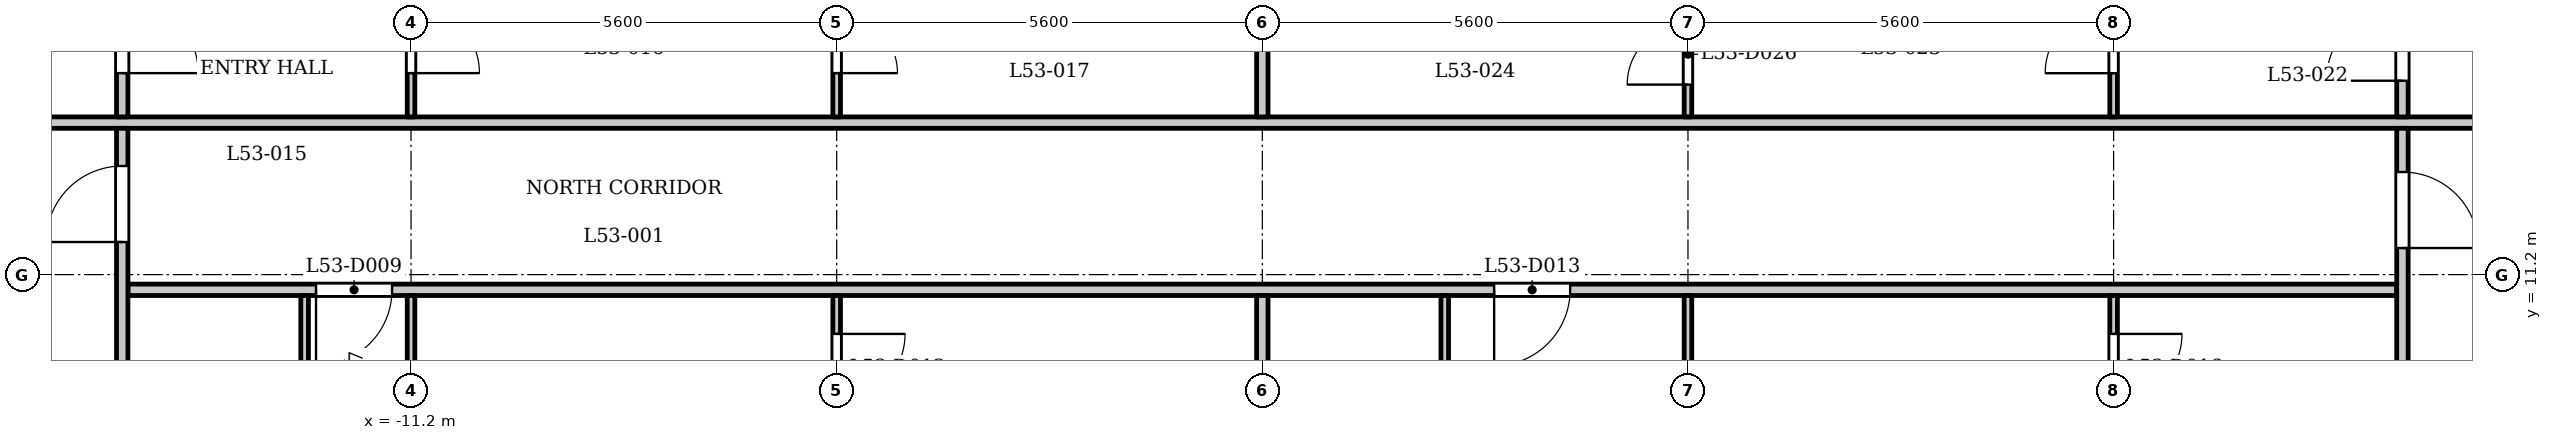
"""IFC4 building model, lengths in metres.
Left out: names, types, materials, properties, quantities, classifications, styles, units other than length and angle.
Written with IfcOpenShell. Run it as: python <this file> out.ifc"""

import sys

from ifc_helpers import new_model, si_unit, direction, frame, frame_2d, origin, place, context, subcontext, project, spatial, rectangle, extrude, element, fill, save


model = new_model("IFC4")
c1 = context("Model", 3, precision=1e-05, world=origin(), true_north=direction((0.0, 1.0)))
c2 = subcontext(c1, "Body", "Model", "MODEL_VIEW")
j1 = project(units=[si_unit("LENGTHUNIT", "METRE"), si_unit("PLANEANGLEUNIT", "RADIAN")], contexts=[c1])
p1 = place(None, origin())
s1 = spatial("IfcSite", under=j1, at=p1, CompositionType="ELEMENT")
p2 = place(p1, origin())
s2 = spatial("IfcBuilding", under=s1, at=p2, CompositionType="ELEMENT")
p3 = place(p2, frame((0.0, 0.0, 206.4)))
s3 = spatial("IfcBuildingStorey", under=s2, at=p3, CompositionType="ELEMENT", Elevation=206.4)
p4 = place(p3, frame((-14.925, 11.0, 0.0), z_axis=(0.0, 0.0, 1.0), x_axis=(1.0, 0.0, 0.0)))
e1 = element("IfcWall", 1, at=p4, inside=s3, PredefinedType="PARTITIONING", context=c2, shape_type="SweptSolid", body=[
    extrude(rectangle(XDim=29.85, YDim=0.15, at=frame_2d((14.925, 0.0))), origin(), (0.0, 0.0, 1.0), 3.2),
])
p5 = place(p4, frame((2.475, 0.0, 0.0)))
e2 = element("IfcOpeningElement", 2, at=p5, cuts=e1, PredefinedType="OPENING", context=c2, shape_type="SweptSolid", body=[
    extrude(rectangle(XDim=1.0, YDim=2.1, at=frame_2d((0.5, 1.05))), frame((0.0, 0.085, 0.0), z_axis=(0.0, -1.0, 0.0), x_axis=(1.0, 0.0, 0.0)), (0.0, 0.0, 1.0), 0.17),
])
p6 = place(p4, frame((17.975, 0.0, 0.0)))
e3 = element("IfcOpeningElement", 3, at=p6, cuts=e1, PredefinedType="OPENING", context=c2, shape_type="SweptSolid", body=[
    extrude(rectangle(XDim=1.0, YDim=2.1, at=frame_2d((0.5, 1.05))), frame((0.0, 0.085, 0.0), z_axis=(0.0, -1.0, 0.0), x_axis=(1.0, 0.0, 0.0)), (0.0, 0.0, 1.0), 0.17),
])
p7 = place(p3, frame((-17.4, 13.2, 0.0), z_axis=(0.0, 0.0, 1.0), x_axis=(1.0, 0.0, 0.0)))
e4 = element("IfcWall", 4, at=p7, inside=s3, PredefinedType="PARTITIONING", context=c2, shape_type="SweptSolid", body=[
    extrude(rectangle(XDim=34.8, YDim=0.15, at=frame_2d((17.4, 0.0))), origin(), (0.0, 0.0, 1.0), 3.2),
])
p8 = place(p7, frame((0.25, 0.0, 0.0)))
e5 = element("IfcOpeningElement", 5, at=p8, cuts=e4, PredefinedType="OPENING", context=c2, shape_type="SweptSolid", body=[
    extrude(rectangle(XDim=1.0, YDim=2.1, at=frame_2d((0.5, 1.05))), frame((0.0, 0.085, 0.0), z_axis=(0.0, -1.0, 0.0), x_axis=(1.0, 0.0, 0.0)), (0.0, 0.0, 1.0), 0.17),
])
p9 = place(p7, frame((33.65, 0.0, 0.0)))
e6 = element("IfcOpeningElement", 6, at=p9, cuts=e4, PredefinedType="OPENING", context=c2, shape_type="SweptSolid", body=[
    extrude(rectangle(XDim=1.0, YDim=2.1, at=frame_2d((0.5, 1.05))), frame((0.0, 0.085, 0.0), z_axis=(0.0, -1.0, 0.0), x_axis=(1.0, 0.0, 0.0)), (0.0, 0.0, 1.0), 0.17),
])
p10 = place(p3, frame((-15.0, 6.769, 0.0), z_axis=(0.0, 0.0, 1.0), x_axis=(0.0, 1.0, 0.0)))
e7 = element("IfcWall", 7, at=p10, inside=s3, PredefinedType="PARTITIONING", context=c2, shape_type="SweptSolid", body=[
    extrude(rectangle(XDim=6.356, YDim=0.15, at=frame_2d((3.178, 0.0))), origin(), (0.0, 0.0, 1.0), 3.2),
])
p11 = place(p10, frame((4.86, 0.0, 0.0)))
e8 = element("IfcOpeningElement", 8, at=p11, cuts=e7, PredefinedType="OPENING", context=c2, shape_type="SweptSolid", body=[
    extrude(rectangle(XDim=1.0, YDim=2.1, at=frame_2d((0.5, 1.05))), frame((0.0, 0.085, 0.0), z_axis=(0.0, -1.0, 0.0), x_axis=(1.0, 0.0, 0.0)), (0.0, 0.0, 1.0), 0.17),
])
p12 = place(p3, frame((-15.0, 13.275, 0.0), z_axis=(0.0, 0.0, 1.0), x_axis=(0.0, 1.0, 0.0)))
e9 = element("IfcWall", 9, at=p12, inside=s3, PredefinedType="PARTITIONING", context=c2, shape_type="SweptSolid", body=[
    extrude(rectangle(XDim=2.05, YDim=0.15, at=frame_2d((1.025, 0.0))), origin(), (0.0, 0.0, 1.0), 3.2),
])
p13 = place(p12, frame((0.576, 0.0, 0.0)))
e10 = element("IfcOpeningElement", 10, at=p13, cuts=e9, PredefinedType="OPENING", context=c2, shape_type="SweptSolid", body=[
    extrude(rectangle(XDim=1.0, YDim=2.1, at=frame_2d((0.5, 1.05))), frame((0.0, 0.085, 0.0), z_axis=(0.0, -1.0, 0.0), x_axis=(1.0, 0.0, 0.0)), (0.0, 0.0, 1.0), 0.17),
])
p14 = place(p3, frame((-12.6, 7.32, 0.0), z_axis=(0.0, 0.0, 1.0), x_axis=(0.0, 1.0, 0.0)))
e11 = element("IfcWall", 11, at=p14, inside=s3, PredefinedType="PARTITIONING", context=c2, shape_type="SweptSolid", body=[
    extrude(rectangle(XDim=3.605, YDim=0.1, at=frame_2d((1.802, 0.0))), origin(), (0.0, 0.0, 1.0), 3.2),
])
p15 = place(p14, frame((1.729, 0.0, 0.0)))
e12 = element("IfcOpeningElement", 12, at=p15, cuts=e11, PredefinedType="OPENING", context=c2, shape_type="SweptSolid", body=[
    extrude(rectangle(XDim=0.8, YDim=2.1, at=frame_2d((0.4, 1.05))), frame((0.0, 0.06, 0.0), z_axis=(0.0, -1.0, 0.0), x_axis=(1.0, 0.0, 0.0)), (0.0, 0.0, 1.0), 0.12),
])
p16 = place(p3, frame((-11.2, 7.32, 0.0), z_axis=(0.0, 0.0, 1.0), x_axis=(0.0, 1.0, 0.0)))
e13 = element("IfcWall", 13, at=p16, inside=s3, PredefinedType="PARTITIONING", context=c2, shape_type="SweptSolid", body=[
    extrude(rectangle(XDim=3.605, YDim=0.1, at=frame_2d((1.802, 0.0))), origin(), (0.0, 0.0, 1.0), 3.2),
])
p17 = place(p16, frame((1.7, 0.0, 0.0)))
e14 = element("IfcOpeningElement", 14, at=p17, cuts=e13, PredefinedType="OPENING", context=c2, shape_type="SweptSolid", body=[
    extrude(rectangle(XDim=0.9, YDim=2.1, at=frame_2d((0.45, 1.05))), frame((0.0, 0.06, 0.0), z_axis=(0.0, -1.0, 0.0), x_axis=(1.0, 0.0, 0.0)), (0.0, 0.0, 1.0), 0.12),
])
p18 = place(p3, frame((-11.2, 13.275, 0.0), z_axis=(0.0, 0.0, 1.0), x_axis=(0.0, 1.0, 0.0)))
e15 = element("IfcWall", 15, at=p18, inside=s3, PredefinedType="PARTITIONING", context=c2, shape_type="SweptSolid", body=[
    extrude(rectangle(XDim=2.575, YDim=0.1, at=frame_2d((1.288, 0.0))), origin(), (0.0, 0.0, 1.0), 3.2),
])
p19 = place(p18, frame((0.576, 0.0, 0.0)))
e16 = element("IfcOpeningElement", 16, at=p19, cuts=e15, PredefinedType="OPENING", context=c2, shape_type="SweptSolid", body=[
    extrude(rectangle(XDim=0.9, YDim=2.1, at=frame_2d((0.45, 1.05))), frame((0.0, 0.06, 0.0), z_axis=(0.0, -1.0, 0.0), x_axis=(1.0, 0.0, 0.0)), (0.0, 0.0, 1.0), 0.12),
])
p20 = place(p3, frame((-5.6, 7.32, 0.0), z_axis=(0.0, 0.0, 1.0), x_axis=(0.0, 1.0, 0.0)))
e17 = element("IfcWall", 17, at=p20, inside=s3, PredefinedType="PARTITIONING", context=c2, shape_type="SweptSolid", body=[
    extrude(rectangle(XDim=3.605, YDim=0.1, at=frame_2d((1.802, 0.0))), origin(), (0.0, 0.0, 1.0), 3.2),
])
p21 = place(p20, frame((2.2, 0.0, 0.0)))
e18 = element("IfcOpeningElement", 18, at=p21, cuts=e17, PredefinedType="OPENING", context=c2, shape_type="SweptSolid", body=[
    extrude(rectangle(XDim=0.9, YDim=2.1, at=frame_2d((0.45, 1.05))), frame((0.0, 0.06, 0.0), z_axis=(0.0, -1.0, 0.0), x_axis=(1.0, 0.0, 0.0)), (0.0, 0.0, 1.0), 0.12),
])
p22 = place(p3, frame((-5.6, 13.275, 0.0), z_axis=(0.0, 0.0, 1.0), x_axis=(0.0, 1.0, 0.0)))
e19 = element("IfcWall", 19, at=p22, inside=s3, PredefinedType="PARTITIONING", context=c2, shape_type="SweptSolid", body=[
    extrude(rectangle(XDim=2.575, YDim=0.1, at=frame_2d((1.288, 0.0))), origin(), (0.0, 0.0, 1.0), 3.2),
])
p23 = place(p22, frame((0.576, 0.0, 0.0)))
e20 = element("IfcOpeningElement", 20, at=p23, cuts=e19, PredefinedType="OPENING", context=c2, shape_type="SweptSolid", body=[
    extrude(rectangle(XDim=0.8, YDim=2.1, at=frame_2d((0.4, 1.05))), frame((0.0, 0.06, 0.0), z_axis=(0.0, -1.0, 0.0), x_axis=(1.0, 0.0, 0.0)), (0.0, 0.0, 1.0), 0.12),
])
p24 = place(p3, frame((0.0, 7.32, 0.0), z_axis=(0.0, 0.0, 1.0), x_axis=(0.0, 1.0, 0.0)))
e21 = element("IfcWall", 21, at=p24, inside=s3, PredefinedType="PARTITIONING", context=c2, shape_type="SweptSolid", body=[
    extrude(rectangle(XDim=3.605, YDim=0.15, at=frame_2d((1.802, 0.0))), origin(), (0.0, 0.0, 1.0), 3.2),
])
p25 = place(p3, frame((0.0, 13.275, 0.0), z_axis=(0.0, 0.0, 1.0), x_axis=(0.0, 1.0, 0.0)))
e22 = element("IfcWall", 22, at=p25, inside=s3, PredefinedType="PARTITIONING", context=c2, shape_type="SweptSolid", body=[
    extrude(rectangle(XDim=2.575, YDim=0.15, at=frame_2d((1.288, 0.0))), origin(), (0.0, 0.0, 1.0), 3.2),
])
p26 = place(p3, frame((2.4, 7.32, 0.0), z_axis=(0.0, 0.0, 1.0), x_axis=(0.0, 1.0, 0.0)))
e23 = element("IfcWall", 23, at=p26, inside=s3, PredefinedType="PARTITIONING", context=c2, shape_type="SweptSolid", body=[
    extrude(rectangle(XDim=3.605, YDim=0.1, at=frame_2d((1.802, 0.0))), origin(), (0.0, 0.0, 1.0), 3.2),
])
p27 = place(p26, frame((0.479, 0.0, 0.0)))
e24 = element("IfcOpeningElement", 24, at=p27, cuts=e23, PredefinedType="OPENING", context=c2, shape_type="SweptSolid", body=[
    extrude(rectangle(XDim=0.8, YDim=2.1, at=frame_2d((0.4, 1.05))), frame((0.0, 0.06, 0.0), z_axis=(0.0, -1.0, 0.0), x_axis=(1.0, 0.0, 0.0)), (0.0, 0.0, 1.0), 0.12),
])
p28 = place(p3, frame((5.6, 7.32, 0.0), z_axis=(0.0, 0.0, 1.0), x_axis=(0.0, 1.0, 0.0)))
e25 = element("IfcWall", 25, at=p28, inside=s3, PredefinedType="PARTITIONING", context=c2, shape_type="SweptSolid", body=[
    extrude(rectangle(XDim=3.605, YDim=0.1, at=frame_2d((1.802, 0.0))), origin(), (0.0, 0.0, 1.0), 3.2),
])
p29 = place(p28, frame((1.7, 0.0, 0.0)))
e26 = element("IfcOpeningElement", 26, at=p29, cuts=e25, PredefinedType="OPENING", context=c2, shape_type="SweptSolid", body=[
    extrude(rectangle(XDim=0.9, YDim=2.1, at=frame_2d((0.45, 1.05))), frame((0.0, 0.06, 0.0), z_axis=(0.0, -1.0, 0.0), x_axis=(1.0, 0.0, 0.0)), (0.0, 0.0, 1.0), 0.12),
])
p30 = place(p3, frame((5.6, 13.275, 0.0), z_axis=(0.0, 0.0, 1.0), x_axis=(0.0, 1.0, 0.0)))
e27 = element("IfcWall", 27, at=p30, inside=s3, PredefinedType="PARTITIONING", context=c2, shape_type="SweptSolid", body=[
    extrude(rectangle(XDim=2.575, YDim=0.1, at=frame_2d((1.288, 0.0))), origin(), (0.0, 0.0, 1.0), 3.2),
])
p31 = place(p30, frame((0.425, 0.0, 0.0)))
e28 = element("IfcOpeningElement", 28, at=p31, cuts=e27, PredefinedType="OPENING", context=c2, shape_type="SweptSolid", body=[
    extrude(rectangle(XDim=0.8, YDim=2.1, at=frame_2d((0.4, 1.05))), frame((0.0, 0.06, 0.0), z_axis=(0.0, -1.0, 0.0), x_axis=(1.0, 0.0, 0.0)), (0.0, 0.0, 1.0), 0.12),
])
p32 = place(p3, frame((11.2, 7.32, 0.0), z_axis=(0.0, 0.0, 1.0), x_axis=(0.0, 1.0, 0.0)))
e29 = element("IfcWall", 29, at=p32, inside=s3, PredefinedType="PARTITIONING", context=c2, shape_type="SweptSolid", body=[
    extrude(rectangle(XDim=3.605, YDim=0.1, at=frame_2d((1.802, 0.0))), origin(), (0.0, 0.0, 1.0), 3.2),
])
p33 = place(p32, frame((2.2, 0.0, 0.0)))
e30 = element("IfcOpeningElement", 30, at=p33, cuts=e29, PredefinedType="OPENING", context=c2, shape_type="SweptSolid", body=[
    extrude(rectangle(XDim=0.9, YDim=2.1, at=frame_2d((0.45, 1.05))), frame((0.0, 0.06, 0.0), z_axis=(0.0, -1.0, 0.0), x_axis=(1.0, 0.0, 0.0)), (0.0, 0.0, 1.0), 0.12),
])
p34 = place(p3, frame((11.2, 13.275, 0.0), z_axis=(0.0, 0.0, 1.0), x_axis=(0.0, 1.0, 0.0)))
e31 = element("IfcWall", 31, at=p34, inside=s3, PredefinedType="PARTITIONING", context=c2, shape_type="SweptSolid", body=[
    extrude(rectangle(XDim=2.575, YDim=0.1, at=frame_2d((1.288, 0.0))), origin(), (0.0, 0.0, 1.0), 3.2),
])
p35 = place(p34, frame((0.575, 0.0, 0.0)))
e32 = element("IfcOpeningElement", 32, at=p35, cuts=e31, PredefinedType="OPENING", context=c2, shape_type="SweptSolid", body=[
    extrude(rectangle(XDim=0.9, YDim=2.1, at=frame_2d((0.45, 1.05))), frame((0.0, 0.06, 0.0), z_axis=(0.0, -1.0, 0.0), x_axis=(1.0, 0.0, 0.0)), (0.0, 0.0, 1.0), 0.12),
])
p36 = place(p3, frame((15.0, 6.769, 0.0), z_axis=(0.0, 0.0, 1.0), x_axis=(0.0, 1.0, 0.0)))
e33 = element("IfcWall", 33, at=p36, inside=s3, PredefinedType="PARTITIONING", context=c2, shape_type="SweptSolid", body=[
    extrude(rectangle(XDim=6.356, YDim=0.15, at=frame_2d((3.178, 0.0))), origin(), (0.0, 0.0, 1.0), 3.2),
])
p37 = place(p36, frame((4.781, 0.0, 0.0)))
e34 = element("IfcOpeningElement", 34, at=p37, cuts=e33, PredefinedType="OPENING", context=c2, shape_type="SweptSolid", body=[
    extrude(rectangle(XDim=1.0, YDim=2.1, at=frame_2d((0.5, 1.05))), frame((0.0, 0.085, 0.0), z_axis=(0.0, -1.0, 0.0), x_axis=(1.0, 0.0, 0.0)), (0.0, 0.0, 1.0), 0.17),
])
p38 = place(p3, frame((15.0, 13.275, 0.0), z_axis=(0.0, 0.0, 1.0), x_axis=(0.0, 1.0, 0.0)))
e35 = element("IfcWall", 35, at=p38, inside=s3, PredefinedType="PARTITIONING", context=c2, shape_type="SweptSolid", body=[
    extrude(rectangle(XDim=2.05, YDim=0.15, at=frame_2d((1.025, 0.0))), origin(), (0.0, 0.0, 1.0), 3.2),
])
p39 = place(p38, frame((0.476, 0.0, 0.0)))
e36 = element("IfcOpeningElement", 36, at=p39, cuts=e35, PredefinedType="OPENING", context=c2, shape_type="SweptSolid", body=[
    extrude(rectangle(XDim=1.0, YDim=2.1, at=frame_2d((0.5, 1.05))), frame((0.0, 0.085, 0.0), z_axis=(0.0, -1.0, 0.0), x_axis=(1.0, 0.0, 0.0)), (0.0, 0.0, 1.0), 0.17),
])
p40 = place(p11, origin())
e37 = element("IfcDoor", 37, at=p40, inside=s3, OperationType="SINGLE_SWING_RIGHT", PredefinedType="DOOR", context=c2, shape_type="SweptSolid", body=[
    extrude(rectangle(XDim=1.0, YDim=2.1, at=frame_2d((0.5, 1.05))), frame((0.0, 0.025, 0.0), z_axis=(0.0, -1.0, 0.0), x_axis=(1.0, 0.0, 0.0)), (0.0, 0.0, 1.0), 0.05),
])
fill(e8, e37)
p41 = place(p37, origin())
e38 = element("IfcDoor", 38, at=p41, inside=s3, OperationType="SINGLE_SWING_LEFT", PredefinedType="DOOR", context=c2, shape_type="SweptSolid", body=[
    extrude(rectangle(XDim=1.0, YDim=2.1, at=frame_2d((0.5, 1.05))), frame((0.0, 0.025, 0.0), z_axis=(0.0, -1.0, 0.0), x_axis=(1.0, 0.0, 0.0)), (0.0, 0.0, 1.0), 0.05),
])
fill(e34, e38)
p42 = place(p5, origin())
e39 = element("IfcDoor", 39, at=p42, inside=s3, OperationType="SINGLE_SWING_LEFT", PredefinedType="DOOR", context=c2, shape_type="SweptSolid", body=[
    extrude(rectangle(XDim=1.0, YDim=2.1, at=frame_2d((0.5, 1.05))), frame((0.0, 0.025, 0.0), z_axis=(0.0, -1.0, 0.0), x_axis=(1.0, 0.0, 0.0)), (0.0, 0.0, 1.0), 0.05),
])
fill(e2, e39)
p43 = place(p21, origin())
e40 = element("IfcDoor", 40, at=p43, inside=s3, OperationType="SINGLE_SWING_RIGHT", PredefinedType="DOOR", context=c2, shape_type="SweptSolid", body=[
    extrude(rectangle(XDim=0.9, YDim=2.1, at=frame_2d((0.45, 1.05))), frame((0.0, 0.025, 0.0), z_axis=(0.0, -1.0, 0.0), x_axis=(1.0, 0.0, 0.0)), (0.0, 0.0, 1.0), 0.05),
])
fill(e18, e40)
p44 = place(p6, origin())
e41 = element("IfcDoor", 41, at=p44, inside=s3, OperationType="SINGLE_SWING_LEFT", PredefinedType="DOOR", context=c2, shape_type="SweptSolid", body=[
    extrude(rectangle(XDim=1.0, YDim=2.1, at=frame_2d((0.5, 1.05))), frame((0.0, 0.025, 0.0), z_axis=(0.0, -1.0, 0.0), x_axis=(1.0, 0.0, 0.0)), (0.0, 0.0, 1.0), 0.05),
])
fill(e3, e41)
p45 = place(p33, origin())
e42 = element("IfcDoor", 42, at=p45, inside=s3, OperationType="SINGLE_SWING_RIGHT", PredefinedType="DOOR", context=c2, shape_type="SweptSolid", body=[
    extrude(rectangle(XDim=0.9, YDim=2.1, at=frame_2d((0.45, 1.05))), frame((0.0, 0.025, 0.0), z_axis=(0.0, -1.0, 0.0), x_axis=(1.0, 0.0, 0.0)), (0.0, 0.0, 1.0), 0.05),
])
fill(e30, e42)
p46 = place(p13, origin())
e43 = element("IfcDoor", 43, at=p46, inside=s3, OperationType="SINGLE_SWING_LEFT", PredefinedType="DOOR", context=c2, shape_type="SweptSolid", body=[
    extrude(rectangle(XDim=1.0, YDim=2.1, at=frame_2d((0.5, 1.05))), frame((0.0, 0.025, 0.0), z_axis=(0.0, -1.0, 0.0), x_axis=(1.0, 0.0, 0.0)), (0.0, 0.0, 1.0), 0.05),
])
fill(e10, e43)
p47 = place(p19, origin())
e44 = element("IfcDoor", 44, at=p47, inside=s3, OperationType="SINGLE_SWING_LEFT", PredefinedType="DOOR", context=c2, shape_type="SweptSolid", body=[
    extrude(rectangle(XDim=0.9, YDim=2.1, at=frame_2d((0.45, 1.05))), frame((0.0, 0.025, 0.0), z_axis=(0.0, -1.0, 0.0), x_axis=(1.0, 0.0, 0.0)), (0.0, 0.0, 1.0), 0.05),
])
fill(e16, e44)
p48 = place(p23, origin())
e45 = element("IfcDoor", 45, at=p48, inside=s3, OperationType="SINGLE_SWING_LEFT", PredefinedType="DOOR", context=c2, shape_type="SweptSolid", body=[
    extrude(rectangle(XDim=0.8, YDim=2.1, at=frame_2d((0.4, 1.05))), frame((0.0, 0.025, 0.0), z_axis=(0.0, -1.0, 0.0), x_axis=(1.0, 0.0, 0.0)), (0.0, 0.0, 1.0), 0.05),
])
fill(e20, e45)
p49 = place(p39, origin())
e46 = element("IfcDoor", 46, at=p49, inside=s3, OperationType="SINGLE_SWING_RIGHT", PredefinedType="DOOR", context=c2, shape_type="SweptSolid", body=[
    extrude(rectangle(XDim=1.0, YDim=2.1, at=frame_2d((0.5, 1.05))), frame((0.0, 0.025, 0.0), z_axis=(0.0, -1.0, 0.0), x_axis=(1.0, 0.0, 0.0)), (0.0, 0.0, 1.0), 0.05),
])
fill(e36, e46)
p50 = place(p35, origin())
e47 = element("IfcDoor", 47, at=p50, inside=s3, OperationType="SINGLE_SWING_RIGHT", PredefinedType="DOOR", context=c2, shape_type="SweptSolid", body=[
    extrude(rectangle(XDim=0.9, YDim=2.1, at=frame_2d((0.45, 1.05))), frame((0.0, 0.025, 0.0), z_axis=(0.0, -1.0, 0.0), x_axis=(1.0, 0.0, 0.0)), (0.0, 0.0, 1.0), 0.05),
])
fill(e32, e47)
p51 = place(p31, origin())
e48 = element("IfcDoor", 48, at=p51, inside=s3, OperationType="SINGLE_SWING_RIGHT", PredefinedType="DOOR", context=c2, shape_type="SweptSolid", body=[
    extrude(rectangle(XDim=0.8, YDim=2.1, at=frame_2d((0.4, 1.05))), frame((0.0, 0.025, 0.0), z_axis=(0.0, -1.0, 0.0), x_axis=(1.0, 0.0, 0.0)), (0.0, 0.0, 1.0), 0.05),
])
fill(e28, e48)
save(model, sys.argv[1])
